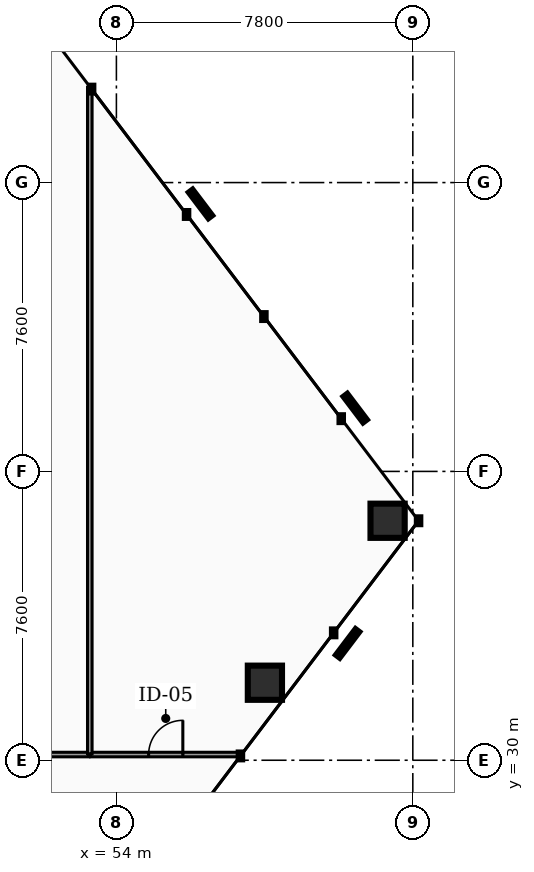
"""IFC4 building model, lengths in metres.
Left out: names, types, materials, properties, quantities, classifications, styles, units other than length and angle.
Written with IfcOpenShell. Run it as: python <this file> out.ifc"""

import sys

from ifc_helpers import new_model, si_unit, direction, frame, frame_2d, origin, origin_2d, place, context, subcontext, project, spatial, rectangle, hollow_rectangle, extrude, element, fill, save


model = new_model("IFC4")
c1 = context("Model", 3, precision=1e-05, world=origin(), true_north=direction((0.0, 1.0)))
c2 = subcontext(c1, "Body", "Model", "MODEL_VIEW")
j1 = project(units=[si_unit("LENGTHUNIT", "METRE"), si_unit("PLANEANGLEUNIT", "RADIAN")], contexts=[c1])
p1 = place(None, origin())
s1 = spatial("IfcSite", under=j1, at=p1, CompositionType="ELEMENT")
p2 = place(p1, origin())
s2 = spatial("IfcBuilding", under=s1, at=p2, CompositionType="ELEMENT")
p3 = place(p2, frame((0.0, 0.0, 80.58)))
s3 = spatial("IfcBuildingStorey", under=s2, at=p3, CompositionType="ELEMENT", Elevation=80.58)
p4 = place(p3, frame((51.453, 49.083, 0.0), z_axis=(0.133650119293, -0.03019948219, 0.990568340342), x_axis=(0.220402689547, 0.975408967787, 0.0)))
e1 = element("IfcColumn", 1, at=p4, inside=s3, PredefinedType="COLUMN", context=c2, shape_type="SweptSolid", body=[
    extrude(hollow_rectangle(XDim=0.9, YDim=0.9, WallThickness=0.045, at=origin_2d()), origin(), (0.0, 0.0, 1.0), 3.856),
])
p5 = place(p3, frame((57.908, 32.04, 0.0), z_axis=(-0.002867922649, 0.075458231471, 0.99714483919), x_axis=(-0.999278524762, -0.037979335823, 0.0)))
e2 = element("IfcColumn", 2, at=p5, inside=s3, PredefinedType="COLUMN", context=c2, shape_type="SweptSolid", body=[
    extrude(hollow_rectangle(XDim=0.9, YDim=0.9, WallThickness=0.045, at=origin_2d()), origin(), (0.0, 0.0, 1.0), 3.831),
])
p6 = place(p3, frame((61.136, 36.302, 0.0), z_axis=(0.025648094804, 0.112750040525, 0.993292305213), x_axis=(-0.975089690986, 0.22181094322, 0.0)))
e3 = element("IfcColumn", 3, at=p6, inside=s3, PredefinedType="COLUMN", context=c2, shape_type="SweptSolid", body=[
    extrude(hollow_rectangle(XDim=0.9, YDim=0.9, WallThickness=0.045, at=origin_2d()), origin(), (0.0, 0.0, 1.0), 3.846),
])
p7 = place(p3, frame((53.32, 30.15, 0.0), z_axis=(0.0, 0.0, 1.0), x_axis=(1.0, 0.0, 0.0)))
e4 = element("IfcWall", 4, at=p7, inside=s3, PredefinedType="PARTITIONING", context=c2, shape_type="SweptSolid", body=[
    extrude(rectangle(XDim=3.956, YDim=0.12, at=frame_2d((1.978, 0.0))), origin(), (0.0, 0.0, 1.0), 2.777),
])
p8 = place(p7, frame((1.528, 0.0, 0.0)))
e5 = element("IfcOpeningElement", 5, at=p8, cuts=e4, PredefinedType="OPENING", context=c2, shape_type="SweptSolid", body=[
    extrude(rectangle(XDim=0.9, YDim=2.05, at=frame_2d((0.45, 1.025))), frame((0.0, 0.07, 0.0), z_axis=(0.0, -1.0, 0.0), x_axis=(1.0, 0.0, 0.0)), (0.0, 0.0, 1.0), 0.14),
])
p9 = place(p3, frame((50.45, 30.15, 0.0), z_axis=(0.0, 0.0, 1.0), x_axis=(1.0, 0.0, 0.0)))
e6 = element("IfcWall", 6, at=p9, inside=s3, PredefinedType="PARTITIONING", context=c2, shape_type="SweptSolid", body=[
    extrude(rectangle(XDim=2.83, YDim=0.12, at=frame_2d((1.415, 0.0))), origin(), (0.0, 0.0, 1.0), 2.777),
])
p10 = place(p3, frame((53.3, 30.17, 0.0), z_axis=(0.0, 0.0, 1.0), x_axis=(0.0, 1.0, 0.0)))
e7 = element("IfcWall", 7, at=p10, inside=s3, PredefinedType="PARTITIONING", context=c2, shape_type="SweptSolid", body=[
    extrude(rectangle(XDim=17.537, YDim=0.12, at=frame_2d((8.769, 0.0))), origin(), (0.0, 0.0, 1.0), 2.777),
])
p11 = place(p8, origin())
e8 = element("IfcDoor", 8, at=p11, inside=s3, OperationType="SINGLE_SWING_RIGHT", PredefinedType="DOOR", context=c2, shape_type="SweptSolid", body=[
    extrude(rectangle(XDim=0.9, YDim=2.05, at=frame_2d((0.45, 1.025))), frame((0.0, 0.025, 0.0), z_axis=(0.0, -1.0, 0.0), x_axis=(1.0, 0.0, 0.0)), (0.0, 0.0, 1.0), 0.05),
])
fill(e5, e8)
save(model, sys.argv[1])
